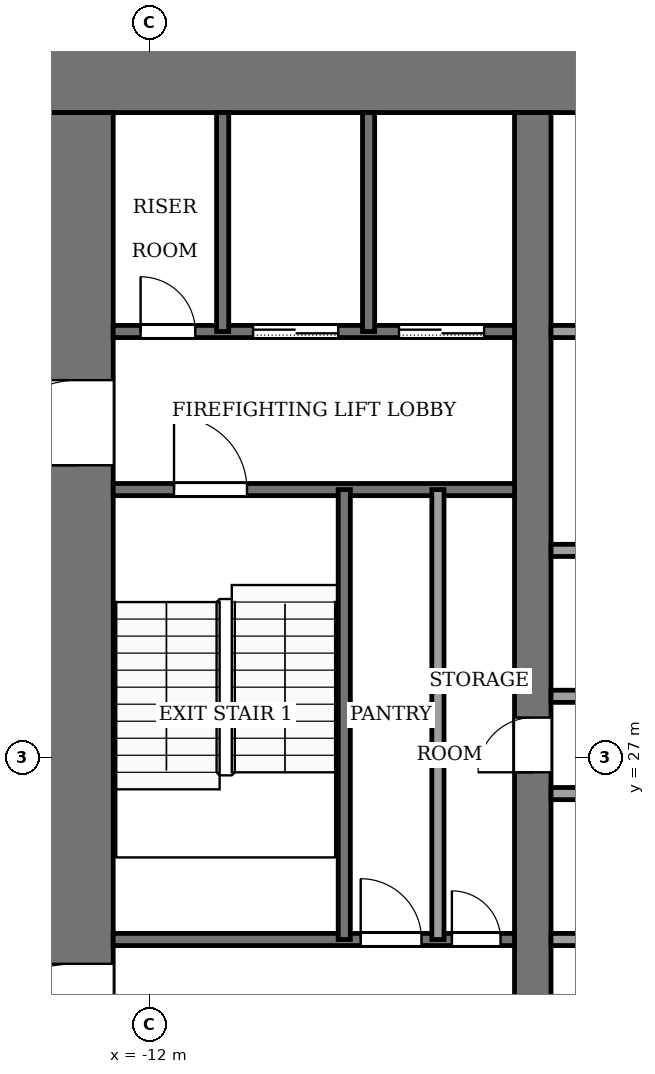
"""IFC4 building model, lengths in metres.
Left out: names, types, materials, properties, quantities, classifications, styles, units other than length and angle.
Written with IfcOpenShell. Run it as: python <this file> out.ifc"""

import sys

from ifc_helpers import new_model, si_unit, direction, frame, frame_2d, origin, place, context, subcontext, project, spatial, rectangle, extrude, element, fill, save


model = new_model("IFC4")
c1 = context("Model", 3, precision=1e-05, world=origin(), true_north=direction((0.0, 1.0)))
c2 = subcontext(c1, "Body", "Model", "MODEL_VIEW")
j1 = project(units=[si_unit("LENGTHUNIT", "METRE"), si_unit("PLANEANGLEUNIT", "RADIAN")], contexts=[c1])
p1 = place(None, origin())
s1 = spatial("IfcSite", under=j1, at=p1, CompositionType="ELEMENT")
p2 = place(p1, origin())
s2 = spatial("IfcBuilding", under=s1, at=p2, CompositionType="ELEMENT")
p3 = place(p2, frame((0.0, 0.0, 110.0)))
s3 = spatial("IfcBuildingStorey", under=s2, at=p3, CompositionType="ELEMENT", Elevation=110.0)
p4 = place(p3, frame((-13.8, 38.2, -0.13), z_axis=(0.0, 0.0, 1.0), x_axis=(1.0, 0.0, 0.0)))
e1 = element("IfcWall", 1, at=p4, inside=s3, PredefinedType="SHEAR", context=c2, shape_type="SweptSolid", body=[
    extrude(rectangle(XDim=27.6, YDim=1.2, at=frame_2d((13.8, 0.0))), origin(), (0.0, 0.0, 1.0), 3.88),
])
p5 = place(p3, frame((-13.2, 18.4, -0.13), z_axis=(0.0, 0.0, 1.0), x_axis=(0.0, 1.0, 0.0)))
e2 = element("IfcWall", 2, at=p5, inside=s3, PredefinedType="SHEAR", context=c2, shape_type="SweptSolid", body=[
    extrude(rectangle(XDim=19.2, YDim=1.2, at=frame_2d((9.6, 0.0))), origin(), (0.0, 0.0, 1.0), 3.88),
])
p6 = place(p5, frame((2.8, 0.0, 0.13)))
e3 = element("IfcOpeningElement", 3, at=p6, cuts=e2, PredefinedType="OPENING", context=c2, shape_type="SweptSolid", body=[
    extrude(rectangle(XDim=2.4, YDim=2.4, at=frame_2d((1.2, 1.2))), frame((0.0, 0.61, 0.0), z_axis=(0.0, -1.0, 0.0), x_axis=(1.0, 0.0, 0.0)), (0.0, 0.0, 1.0), 1.22),
])
p7 = place(p5, frame((13.4, 0.0, 0.13)))
e4 = element("IfcOpeningElement", 4, at=p7, cuts=e2, PredefinedType="OPENING", context=c2, shape_type="SweptSolid", body=[
    extrude(rectangle(XDim=1.4, YDim=2.2, at=frame_2d((0.7, 1.1))), frame((0.0, 0.61, 0.0), z_axis=(0.0, -1.0, 0.0), x_axis=(1.0, 0.0, 0.0)), (0.0, 0.0, 1.0), 1.22),
])
p8 = place(p3, frame((-5.7, 18.4, -0.13), z_axis=(0.0, 0.0, 1.0), x_axis=(0.0, 1.0, 0.0)))
e5 = element("IfcWall", 5, at=p8, inside=s3, PredefinedType="SHEAR", context=c2, shape_type="SweptSolid", body=[
    extrude(rectangle(XDim=19.2, YDim=0.6, at=frame_2d((9.6, 0.0))), origin(), (0.0, 0.0, 1.0), 3.88),
])
p9 = place(p8, frame((8.35, 0.0, 0.13)))
e6 = element("IfcOpeningElement", 6, at=p9, cuts=e5, PredefinedType="OPENING", context=c2, shape_type="SweptSolid", body=[
    extrude(rectangle(XDim=0.9, YDim=2.1, at=frame_2d((0.45, 1.05))), frame((0.0, 0.31, 0.0), z_axis=(0.0, -1.0, 0.0), x_axis=(1.0, 0.0, 0.0)), (0.0, 0.0, 1.0), 0.62),
])
p10 = place(p3, frame((-12.6, 24.0, 0.0), z_axis=(0.0, 0.0, 1.0), x_axis=(1.0, 0.0, 0.0)))
e7 = element("IfcWall", 7, at=p10, inside=s3, PredefinedType="PARTITIONING", context=c2, shape_type="SweptSolid", body=[
    extrude(rectangle(XDim=6.6, YDim=0.2, at=frame_2d((3.3, 0.0))), origin(), (0.0, 0.0, 1.0), 3.75),
])
p11 = place(p10, frame((4.07, 0.0, 0.0)))
e8 = element("IfcOpeningElement", 8, at=p11, cuts=e7, PredefinedType="OPENING", context=c2, shape_type="SweptSolid", body=[
    extrude(rectangle(XDim=1.0, YDim=2.1, at=frame_2d((0.5, 1.05))), frame((0.0, 0.11, 0.0), z_axis=(0.0, -1.0, 0.0), x_axis=(1.0, 0.0, 0.0)), (0.0, 0.0, 1.0), 0.22),
])
p12 = place(p10, frame((5.57, 0.0, 0.0)))
e9 = element("IfcOpeningElement", 9, at=p12, cuts=e7, PredefinedType="OPENING", context=c2, shape_type="SweptSolid", body=[
    extrude(rectangle(XDim=0.8, YDim=2.1, at=frame_2d((0.4, 1.05))), frame((0.0, 0.11, 0.0), z_axis=(0.0, -1.0, 0.0), x_axis=(1.0, 0.0, 0.0)), (0.0, 0.0, 1.0), 0.22),
])
p13 = place(p3, frame((-5.4, 24.0, 0.0), z_axis=(0.0, 0.0, 1.0), x_axis=(1.0, 0.0, 0.0)))
e10 = element("IfcWall", 10, at=p13, inside=s3, PredefinedType="PARTITIONING", context=c2, shape_type="SweptSolid", body=[
    extrude(rectangle(XDim=10.8, YDim=0.2, at=frame_2d((5.4, 0.0))), origin(), (0.0, 0.0, 1.0), 3.75),
])
p14 = place(p13, frame((0.75, 0.0, 0.0)))
e11 = element("IfcOpeningElement", 11, at=p14, cuts=e10, PredefinedType="OPENING", context=c2, shape_type="SweptSolid", body=[
    extrude(rectangle(XDim=1.2, YDim=2.2, at=frame_2d((0.6, 1.1))), frame((0.0, 0.11, 0.0), z_axis=(0.0, -1.0, 0.0), x_axis=(1.0, 0.0, 0.0)), (0.0, 0.0, 1.0), 0.22),
])
p15 = place(p13, frame((3.45, 0.0, 0.0)))
e12 = element("IfcOpeningElement", 12, at=p15, cuts=e10, PredefinedType="OPENING", context=c2, shape_type="SweptSolid", body=[
    extrude(rectangle(XDim=1.2, YDim=2.2, at=frame_2d((0.6, 1.1))), frame((0.0, 0.11, 0.0), z_axis=(0.0, -1.0, 0.0), x_axis=(1.0, 0.0, 0.0)), (0.0, 0.0, 1.0), 0.22),
])
p16 = place(p13, frame((6.15, 0.0, 0.0)))
e13 = element("IfcOpeningElement", 13, at=p16, cuts=e10, PredefinedType="OPENING", context=c2, shape_type="SweptSolid", body=[
    extrude(rectangle(XDim=1.2, YDim=2.2, at=frame_2d((0.6, 1.1))), frame((0.0, 0.11, 0.0), z_axis=(0.0, -1.0, 0.0), x_axis=(1.0, 0.0, 0.0)), (0.0, 0.0, 1.0), 0.22),
])
p17 = place(p13, frame((8.85, 0.0, 0.0)))
e14 = element("IfcOpeningElement", 14, at=p17, cuts=e10, PredefinedType="OPENING", context=c2, shape_type="SweptSolid", body=[
    extrude(rectangle(XDim=1.2, YDim=2.2, at=frame_2d((0.6, 1.1))), frame((0.0, 0.11, 0.0), z_axis=(0.0, -1.0, 0.0), x_axis=(1.0, 0.0, 0.0)), (0.0, 0.0, 1.0), 0.22),
])
for number, where, z_axis, x_axis in (
    (15, (-5.4, 26.4, 0.0), (0.0, 0.0, 1.0), (1.0, 0.0, 0.0)),
    (16, (-5.4, 28.0, 0.0), (0.0, 0.0, 1.0), (1.0, 0.0, 0.0)),
    (17, (-5.4, 30.4, 0.0), (0.0, 0.0, 1.0), (1.0, 0.0, 0.0)),
):
    element("IfcWall", number, at=place(p3, frame(where, z_axis=z_axis, x_axis=x_axis)), inside=s3, PredefinedType="PARTITIONING", context=c2, shape_type="SweptSolid", body=[
        extrude(rectangle(XDim=10.8, YDim=0.2, at=frame_2d((5.4, 0.0))), origin(), (0.0, 0.0, 1.0), 3.75),
    ])
p18 = place(p3, frame((-12.6, 31.4, 0.0), z_axis=(0.0, 0.0, 1.0), x_axis=(1.0, 0.0, 0.0)))
e18 = element("IfcWall", 18, at=p18, inside=s3, PredefinedType="PARTITIONING", context=c2, shape_type="SweptSolid", body=[
    extrude(rectangle(XDim=6.6, YDim=0.2, at=frame_2d((3.3, 0.0))), origin(), (0.0, 0.0, 1.0), 3.75),
])
p19 = place(p18, frame((1.0, 0.0, 0.0)))
e19 = element("IfcOpeningElement", 19, at=p19, cuts=e18, PredefinedType="OPENING", context=c2, shape_type="SweptSolid", body=[
    extrude(rectangle(XDim=1.2, YDim=2.2, at=frame_2d((0.6, 1.1))), frame((0.0, 0.11, 0.0), z_axis=(0.0, -1.0, 0.0), x_axis=(1.0, 0.0, 0.0)), (0.0, 0.0, 1.0), 0.22),
])
p20 = place(p3, frame((-12.6, 34.0, 0.0), z_axis=(0.0, 0.0, 1.0), x_axis=(1.0, 0.0, 0.0)))
e20 = element("IfcWall", 20, at=p20, inside=s3, PredefinedType="PARTITIONING", context=c2, shape_type="SweptSolid", body=[
    extrude(rectangle(XDim=6.6, YDim=0.2, at=frame_2d((3.3, 0.0))), origin(), (0.0, 0.0, 1.0), 3.75),
])
p21 = place(p20, frame((4.7, 0.0, 0.0)))
e21 = element("IfcOpeningElement", 21, at=p21, cuts=e20, PredefinedType="OPENING", context=c2, shape_type="SweptSolid", body=[
    extrude(rectangle(XDim=1.4, YDim=2.2, at=frame_2d((0.7, 1.1))), frame((0.0, 0.11, 0.0), z_axis=(0.0, -1.0, 0.0), x_axis=(1.0, 0.0, 0.0)), (0.0, 0.0, 1.0), 0.22),
])
p22 = place(p20, frame((2.3, 0.0, 0.0)))
e22 = element("IfcOpeningElement", 22, at=p22, cuts=e20, PredefinedType="OPENING", context=c2, shape_type="SweptSolid", body=[
    extrude(rectangle(XDim=1.4, YDim=2.2, at=frame_2d((0.7, 1.1))), frame((0.0, 0.11, 0.0), z_axis=(0.0, -1.0, 0.0), x_axis=(1.0, 0.0, 0.0)), (0.0, 0.0, 1.0), 0.22),
])
p23 = place(p20, frame((0.45, 0.0, 0.0)))
e23 = element("IfcOpeningElement", 23, at=p23, cuts=e20, PredefinedType="OPENING", context=c2, shape_type="SweptSolid", body=[
    extrude(rectangle(XDim=0.9, YDim=2.1, at=frame_2d((0.45, 1.05))), frame((0.0, 0.11, 0.0), z_axis=(0.0, -1.0, 0.0), x_axis=(1.0, 0.0, 0.0)), (0.0, 0.0, 1.0), 0.22),
])
p24 = place(p3, frame((-5.4, 34.0, 0.0), z_axis=(0.0, 0.0, 1.0), x_axis=(1.0, 0.0, 0.0)))
e24 = element("IfcWall", 24, at=p24, inside=s3, PredefinedType="PARTITIONING", context=c2, shape_type="SweptSolid", body=[
    extrude(rectangle(XDim=10.8, YDim=0.2, at=frame_2d((5.4, 0.0))), origin(), (0.0, 0.0, 1.0), 3.75),
])
p25 = place(p24, frame((6.15, 0.0, 0.0)))
e25 = element("IfcOpeningElement", 25, at=p25, cuts=e24, PredefinedType="OPENING", context=c2, shape_type="SweptSolid", body=[
    extrude(rectangle(XDim=1.2, YDim=2.2, at=frame_2d((0.6, 1.1))), frame((0.0, 0.11, 0.0), z_axis=(0.0, -1.0, 0.0), x_axis=(1.0, 0.0, 0.0)), (0.0, 0.0, 1.0), 0.22),
])
p26 = place(p24, frame((8.95, 0.0, 0.0)))
e26 = element("IfcOpeningElement", 26, at=p26, cuts=e24, PredefinedType="OPENING", context=c2, shape_type="SweptSolid", body=[
    extrude(rectangle(XDim=1.0, YDim=2.1, at=frame_2d((0.5, 1.05))), frame((0.0, 0.11, 0.0), z_axis=(0.0, -1.0, 0.0), x_axis=(1.0, 0.0, 0.0)), (0.0, 0.0, 1.0), 0.22),
])
p27 = place(p3, frame((-10.8, 34.0, 0.0), z_axis=(0.0, 0.0, 1.0), x_axis=(0.0, 1.0, 0.0)))
e27 = element("IfcWall", 27, at=p27, inside=s3, PredefinedType="PARTITIONING", context=c2, shape_type="SweptSolid", body=[
    extrude(rectangle(XDim=3.6, YDim=0.2, at=frame_2d((1.8, 0.0))), origin(), (0.0, 0.0, 1.0), 3.75),
])
p28 = place(p3, frame((-8.8, 24.0, 0.0), z_axis=(0.0, 0.0, 1.0), x_axis=(0.0, 1.0, 0.0)))
e28 = element("IfcWall", 28, at=p28, inside=s3, PredefinedType="PARTITIONING", context=c2, shape_type="SweptSolid", body=[
    extrude(rectangle(XDim=7.4, YDim=0.2, at=frame_2d((3.7, 0.0))), origin(), (0.0, 0.0, 1.0), 3.75),
])
p29 = place(p3, frame((-8.4, 34.0, 0.0), z_axis=(0.0, 0.0, 1.0), x_axis=(0.0, 1.0, 0.0)))
e29 = element("IfcWall", 29, at=p29, inside=s3, PredefinedType="PARTITIONING", context=c2, shape_type="SweptSolid", body=[
    extrude(rectangle(XDim=3.6, YDim=0.2, at=frame_2d((1.8, 0.0))), origin(), (0.0, 0.0, 1.0), 3.75),
])
p30 = place(p3, frame((-7.26, 24.0, 0.0), z_axis=(0.0, 0.0, 1.0), x_axis=(0.0, 1.0, 0.0)))
e30 = element("IfcWall", 30, at=p30, inside=s3, PredefinedType="PARTITIONING", context=c2, shape_type="SweptSolid", body=[
    extrude(rectangle(XDim=7.4, YDim=0.2, at=frame_2d((3.7, 0.0))), origin(), (0.0, 0.0, 1.0), 3.75),
])
p31 = place(p21, origin())
e31 = element("IfcDoor", 31, at=p31, inside=s3, OperationType="SLIDING_TO_LEFT", PredefinedType="DOOR", context=c2, shape_type="SweptSolid", body=[
    extrude(rectangle(XDim=1.4, YDim=2.2, at=frame_2d((0.7, 1.1))), frame((0.0, 0.025, 0.0), z_axis=(0.0, -1.0, 0.0), x_axis=(1.0, 0.0, 0.0)), (0.0, 0.0, 1.0), 0.05),
])
fill(e21, e31)
p32 = place(p22, origin())
e32 = element("IfcDoor", 32, at=p32, inside=s3, OperationType="SLIDING_TO_LEFT", PredefinedType="DOOR", context=c2, shape_type="SweptSolid", body=[
    extrude(rectangle(XDim=1.4, YDim=2.2, at=frame_2d((0.7, 1.1))), frame((0.0, 0.025, 0.0), z_axis=(0.0, -1.0, 0.0), x_axis=(1.0, 0.0, 0.0)), (0.0, 0.0, 1.0), 0.05),
])
fill(e22, e32)
p33 = place(p23, origin())
e33 = element("IfcDoor", 33, at=p33, inside=s3, OperationType="SINGLE_SWING_RIGHT", PredefinedType="DOOR", context=c2, shape_type="SweptSolid", body=[
    extrude(rectangle(XDim=0.9, YDim=2.1, at=frame_2d((0.45, 1.05))), frame((0.0, 0.025, 0.0), z_axis=(0.0, -1.0, 0.0), x_axis=(1.0, 0.0, 0.0)), (0.0, 0.0, 1.0), 0.05),
])
fill(e23, e33)
p34 = place(p11, origin())
e34 = element("IfcDoor", 34, at=p34, inside=s3, OperationType="SINGLE_SWING_RIGHT", PredefinedType="DOOR", context=c2, shape_type="SweptSolid", body=[
    extrude(rectangle(XDim=1.0, YDim=2.1, at=frame_2d((0.5, 1.05))), frame((0.0, 0.025, 0.0), z_axis=(0.0, -1.0, 0.0), x_axis=(1.0, 0.0, 0.0)), (0.0, 0.0, 1.0), 0.05),
])
fill(e8, e34)
p35 = place(p12, origin())
e35 = element("IfcDoor", 35, at=p35, inside=s3, OperationType="SINGLE_SWING_LEFT", PredefinedType="DOOR", context=c2, shape_type="SweptSolid", body=[
    extrude(rectangle(XDim=0.8, YDim=2.1, at=frame_2d((0.4, 1.05))), frame((0.0, 0.025, 0.0), z_axis=(0.0, -1.0, 0.0), x_axis=(1.0, 0.0, 0.0)), (0.0, 0.0, 1.0), 0.05),
])
fill(e9, e35)
p36 = place(p9, origin())
e36 = element("IfcDoor", 36, at=p36, inside=s3, OperationType="SINGLE_SWING_LEFT", PredefinedType="DOOR", context=c2, shape_type="SweptSolid", body=[
    extrude(rectangle(XDim=0.9, YDim=2.1, at=frame_2d((0.45, 1.05))), frame((0.0, 0.025, 0.0), z_axis=(0.0, -1.0, 0.0), x_axis=(1.0, 0.0, 0.0)), (0.0, 0.0, 1.0), 0.05),
])
fill(e6, e36)
p37 = place(p19, origin())
e37 = element("IfcDoor", 37, at=p37, inside=s3, OperationType="SINGLE_SWING_RIGHT", PredefinedType="DOOR", context=c2, shape_type="SweptSolid", body=[
    extrude(rectangle(XDim=1.2, YDim=2.2, at=frame_2d((0.6, 1.1))), frame((0.0, 0.025, 0.0), z_axis=(0.0, -1.0, 0.0), x_axis=(1.0, 0.0, 0.0)), (0.0, 0.0, 1.0), 0.05),
])
fill(e19, e37)
p38 = place(p6, origin())
e38 = element("IfcDoor", 38, at=p38, inside=s3, OperationType="DOUBLE_DOOR_SINGLE_SWING", PredefinedType="DOOR", context=c2, shape_type="SweptSolid", body=[
    extrude(rectangle(XDim=2.4, YDim=2.4, at=frame_2d((1.2, 1.2))), frame((0.0, 0.025, 0.0), z_axis=(0.0, -1.0, 0.0), x_axis=(1.0, 0.0, 0.0)), (0.0, 0.0, 1.0), 0.05),
])
fill(e3, e38)
p39 = place(p7, origin())
e39 = element("IfcDoor", 39, at=p39, inside=s3, OperationType="SINGLE_SWING_RIGHT", PredefinedType="DOOR", context=c2, shape_type="SweptSolid", body=[
    extrude(rectangle(XDim=1.4, YDim=2.2, at=frame_2d((0.7, 1.1))), frame((0.0, 0.025, 0.0), z_axis=(0.0, -1.0, 0.0), x_axis=(1.0, 0.0, 0.0)), (0.0, 0.0, 1.0), 0.05),
])
fill(e4, e39)
save(model, sys.argv[1])
